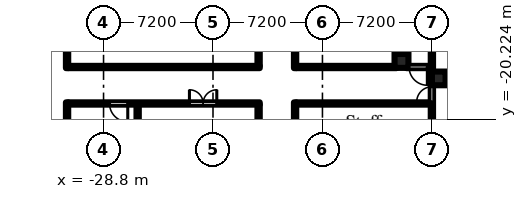
"""IFC4 building model, lengths in metres.
Left out: names, types, materials, properties, quantities, classifications, styles, units other than length and angle.
Written with IfcOpenShell. Run it as: python <this file> out.ifc"""

import sys

from ifc_helpers import new_model, si_unit, direction, frame, frame_2d, origin, origin_2d, place, context, subcontext, project, spatial, rectangle, hollow_circle, extrude, element, fill, save


model = new_model("IFC4")
c1 = context("Model", 3, precision=1e-05, world=origin(), true_north=direction((0.0, 1.0)))
c2 = subcontext(c1, "Body", "Model", "MODEL_VIEW")
j1 = project(units=[si_unit("LENGTHUNIT", "METRE"), si_unit("PLANEANGLEUNIT", "RADIAN")], contexts=[c1])
p1 = place(None, origin())
s1 = spatial("IfcSite", under=j1, at=p1, CompositionType="ELEMENT")
p2 = place(p1, origin())
s2 = spatial("IfcBuilding", under=s1, at=p2, CompositionType="ELEMENT")
p3 = place(p2, origin())
s3 = spatial("IfcBuildingStorey", under=s2, at=p3, CompositionType="ELEMENT", Elevation=0.0)
p4 = place(p3, frame((-6.75, -17.55, 0.0), z_axis=(0.0, 0.0, 1.0), x_axis=(1.0, 0.0, 0.0)))
e1 = element("IfcColumn", 1, at=p4, inside=s3, PredefinedType="COLUMN", context=c2, shape_type="SweptSolid", body=[
    extrude(rectangle(XDim=0.9, YDim=0.9, at=origin_2d()), origin(), (0.0, 0.0, 1.0), 7.2),
])
p5 = place(p3, frame((-9.2, -16.4, 0.0), z_axis=(0.0, 0.0, 1.0), x_axis=(1.0, 0.0, 0.0)))
e2 = element("IfcColumn", 2, at=p5, inside=s3, PredefinedType="COLUMN", context=c2, shape_type="SweptSolid", body=[
    extrude(hollow_circle(Radius=0.457, WallThickness=0.05, at=origin_2d()), origin(), (0.0, 0.0, 1.0), 7.5),
])
p6 = place(p3, frame((-31.2, -31.275, 0.0), z_axis=(0.0, 0.0, 1.0), x_axis=(0.0, 1.0, 0.0)))
e3 = element("IfcWall", 3, at=p6, inside=s3, PredefinedType="PARTITIONING", context=c2, shape_type="SweptSolid", body=[
    extrude(rectangle(XDim=12.15, YDim=0.15, at=frame_2d((6.075, 0.0))), origin(), (0.0, 0.0, 1.0), 6.6),
])
p7 = place(p3, frame((-31.125, -19.2, 0.0), z_axis=(0.0, 0.0, 1.0), x_axis=(1.0, 0.0, 0.0)))
e4 = element("IfcWall", 4, at=p7, inside=s3, PredefinedType="PARTITIONING", context=c2, shape_type="SweptSolid", body=[
    extrude(rectangle(XDim=12.6, YDim=0.15, at=frame_2d((6.3, 0.0))), origin(), (0.0, 0.0, 1.0), 6.6),
])
p8 = place(p7, frame((2.718, 0.0, 0.0)))
e5 = element("IfcOpeningElement", 5, at=p8, cuts=e4, PredefinedType="OPENING", context=c2, shape_type="SweptSolid", body=[
    extrude(rectangle(XDim=1.2, YDim=2.1, at=frame_2d((0.6, 1.05))), frame((0.0, 0.085, 0.0), z_axis=(0.0, -1.0, 0.0), x_axis=(1.0, 0.0, 0.0)), (0.0, 0.0, 1.0), 0.17),
])
p9 = place(p7, frame((7.975, 0.0, 0.0)))
e6 = element("IfcOpeningElement", 6, at=p9, cuts=e4, PredefinedType="OPENING", context=c2, shape_type="SweptSolid", body=[
    extrude(rectangle(XDim=1.8, YDim=2.1, at=frame_2d((0.9, 1.05))), frame((0.0, 0.085, 0.0), z_axis=(0.0, -1.0, 0.0), x_axis=(1.0, 0.0, 0.0)), (0.0, 0.0, 1.0), 0.17),
])
p10 = place(p3, frame((-31.2, -16.875, 0.0), z_axis=(0.0, 0.0, 1.0), x_axis=(0.0, 1.0, 0.0)))
e7 = element("IfcWall", 7, at=p10, inside=s3, PredefinedType="PARTITIONING", context=c2, shape_type="SweptSolid", body=[
    extrude(rectangle(XDim=6.55, YDim=0.15, at=frame_2d((3.275, 0.0))), origin(), (0.0, 0.0, 1.0), 6.6),
])
p11 = place(p10, frame((1.325, 0.0, 0.0)))
e8 = element("IfcOpeningElement", 8, at=p11, cuts=e7, PredefinedType="OPENING", context=c2, shape_type="SweptSolid", body=[
    extrude(rectangle(XDim=1.8, YDim=2.1, at=frame_2d((0.9, 1.05))), frame((0.0, 0.085, 0.0), z_axis=(0.0, -1.0, 0.0), x_axis=(1.0, 0.0, 0.0)), (0.0, 0.0, 1.0), 0.17),
])
p12 = place(p3, frame((-31.125, -16.8, 0.0), z_axis=(0.0, 0.0, 1.0), x_axis=(1.0, 0.0, 0.0)))
e9 = element("IfcWall", 9, at=p12, inside=s3, PredefinedType="PARTITIONING", context=c2, shape_type="SweptSolid", body=[
    extrude(rectangle(XDim=12.6, YDim=0.15, at=frame_2d((6.3, 0.0))), origin(), (0.0, 0.0, 1.0), 6.6),
])
for number, where, z_axis, x_axis in (
    (10, (-26.557, -31.125, 0.0), (0.0, 0.0, 1.0), (0.0, 1.0, 0.0)),
    (11, (-18.6, -31.125, 0.0), (0.0, 0.0, 1.0), (0.0, 1.0, 0.0)),
):
    element("IfcWall", number, at=place(p3, frame(where, z_axis=z_axis, x_axis=x_axis)), inside=s3, PredefinedType="PARTITIONING", context=c2, shape_type="SweptSolid", body=[
        extrude(rectangle(XDim=11.85, YDim=0.15, at=frame_2d((5.925, 0.0))), origin(), (0.0, 0.0, 1.0), 6.6),
    ])
p13 = place(p3, frame((-18.6, -16.725, 0.0), z_axis=(0.0, 0.0, 1.0), x_axis=(0.0, 1.0, 0.0)))
e12 = element("IfcWall", 12, at=p13, inside=s3, PredefinedType="PARTITIONING", context=c2, shape_type="SweptSolid", body=[
    extrude(rectangle(XDim=6.4, YDim=0.15, at=frame_2d((3.2, 0.0))), origin(), (0.0, 0.0, 1.0), 6.6),
])
p14 = place(p13, frame((3.425, 0.0, 0.0)))
e13 = element("IfcOpeningElement", 13, at=p14, cuts=e12, PredefinedType="OPENING", context=c2, shape_type="SweptSolid", body=[
    extrude(rectangle(XDim=1.8, YDim=2.1, at=frame_2d((0.9, 1.05))), frame((0.0, 0.085, 0.0), z_axis=(0.0, -1.0, 0.0), x_axis=(1.0, 0.0, 0.0)), (0.0, 0.0, 1.0), 0.17),
])
p15 = place(p3, frame((-16.2, -31.275, 0.0), z_axis=(0.0, 0.0, 1.0), x_axis=(0.0, 1.0, 0.0)))
e14 = element("IfcWall", 14, at=p15, inside=s3, PredefinedType="PARTITIONING", context=c2, shape_type="SweptSolid", body=[
    extrude(rectangle(XDim=12.15, YDim=0.15, at=frame_2d((6.075, 0.0))), origin(), (0.0, 0.0, 1.0), 6.6),
])
p16 = place(p15, frame((1.717, 0.0, 0.0)))
e15 = element("IfcOpeningElement", 15, at=p16, cuts=e14, PredefinedType="OPENING", context=c2, shape_type="SweptSolid", body=[
    extrude(rectangle(XDim=1.2, YDim=2.1, at=frame_2d((0.6, 1.05))), frame((0.0, 0.085, 0.0), z_axis=(0.0, -1.0, 0.0), x_axis=(1.0, 0.0, 0.0)), (0.0, 0.0, 1.0), 0.17),
])
p17 = place(p15, frame((6.925, 0.0, 0.0)))
e16 = element("IfcOpeningElement", 16, at=p17, cuts=e14, PredefinedType="OPENING", context=c2, shape_type="SweptSolid", body=[
    extrude(rectangle(XDim=1.8, YDim=2.1, at=frame_2d((0.9, 1.05))), frame((0.0, 0.085, 0.0), z_axis=(0.0, -1.0, 0.0), x_axis=(1.0, 0.0, 0.0)), (0.0, 0.0, 1.0), 0.17),
])
p18 = place(p3, frame((-16.125, -19.2, 0.0), z_axis=(0.0, 0.0, 1.0), x_axis=(1.0, 0.0, 0.0)))
e17 = element("IfcWall", 17, at=p18, inside=s3, PredefinedType="PARTITIONING", context=c2, shape_type="SweptSolid", body=[
    extrude(rectangle(XDim=8.85, YDim=0.15, at=frame_2d((4.425, 0.0))), origin(), (0.0, 0.0, 1.0), 6.6),
])
p19 = place(p3, frame((-16.2, -16.875, 0.0), z_axis=(0.0, 0.0, 1.0), x_axis=(0.0, 1.0, 0.0)))
e18 = element("IfcWall", 18, at=p19, inside=s3, PredefinedType="PARTITIONING", context=c2, shape_type="SweptSolid", body=[
    extrude(rectangle(XDim=6.55, YDim=0.15, at=frame_2d((3.275, 0.0))), origin(), (0.0, 0.0, 1.0), 6.6),
])
p20 = place(p19, frame((1.911, 0.0, 0.0)))
e19 = element("IfcOpeningElement", 19, at=p20, cuts=e18, PredefinedType="OPENING", context=c2, shape_type="SweptSolid", body=[
    extrude(rectangle(XDim=1.2, YDim=2.1, at=frame_2d((0.6, 1.05))), frame((0.0, 0.085, 0.0), z_axis=(0.0, -1.0, 0.0), x_axis=(1.0, 0.0, 0.0)), (0.0, 0.0, 1.0), 0.17),
])
p21 = place(p19, frame((4.411, 0.0, 0.0)))
e20 = element("IfcOpeningElement", 20, at=p21, cuts=e18, PredefinedType="OPENING", context=c2, shape_type="SweptSolid", body=[
    extrude(rectangle(XDim=1.2, YDim=2.1, at=frame_2d((0.6, 1.05))), frame((0.0, 0.085, 0.0), z_axis=(0.0, -1.0, 0.0), x_axis=(1.0, 0.0, 0.0)), (0.0, 0.0, 1.0), 0.17),
])
p22 = place(p3, frame((-16.125, -16.8, 0.0), z_axis=(0.0, 0.0, 1.0), x_axis=(1.0, 0.0, 0.0)))
e21 = element("IfcWall", 21, at=p22, inside=s3, PredefinedType="PARTITIONING", context=c2, shape_type="SweptSolid", body=[
    extrude(rectangle(XDim=6.604, YDim=0.15, at=frame_2d((3.302, 0.0))), origin(), (0.0, 0.0, 1.0), 6.6),
])
p23 = place(p3, frame((-8.878, -16.8, 0.0), z_axis=(0.0, 0.0, 1.0), x_axis=(1.0, 0.0, 0.0)))
e22 = element("IfcWall", 22, at=p23, inside=s3, PredefinedType="PARTITIONING", context=c2, shape_type="SweptSolid", body=[
    extrude(rectangle(XDim=1.604, YDim=0.15, at=frame_2d((0.802, 0.0))), origin(), (0.0, 0.0, 1.0), 6.6),
])
p24 = place(p23, frame((0.178, 0.0, 0.0)))
e23 = element("IfcOpeningElement", 23, at=p24, cuts=e22, PredefinedType="OPENING", context=c2, shape_type="SweptSolid", body=[
    extrude(rectangle(XDim=1.2, YDim=2.1, at=frame_2d((0.6, 1.05))), frame((0.0, 0.085, 0.0), z_axis=(0.0, -1.0, 0.0), x_axis=(1.0, 0.0, 0.0)), (0.0, 0.0, 1.0), 0.17),
])
p25 = place(p3, frame((-7.2, -31.125, 0.0), z_axis=(0.0, 0.0, 1.0), x_axis=(0.0, 1.0, 0.0)))
e24 = element("IfcWall", 24, at=p25, inside=s3, PredefinedType="PARTITIONING", context=c2, shape_type="SweptSolid", body=[
    extrude(rectangle(XDim=23.988, YDim=0.15, at=frame_2d((11.994, 0.0))), origin(), (0.0, 0.0, 1.0), 6.3),
])
p26 = place(p25, frame((12.025, 0.0, 0.0)))
e25 = element("IfcOpeningElement", 25, at=p26, cuts=e24, PredefinedType="OPENING", context=c2, shape_type="SweptSolid", body=[
    extrude(rectangle(XDim=1.0, YDim=2.1, at=frame_2d((0.5, 1.05))), frame((0.0, 0.085, 0.0), z_axis=(0.0, -1.0, 0.0), x_axis=(1.0, 0.0, 0.0)), (0.0, 0.0, 1.0), 0.17),
])
p27 = place(p25, frame((6.767, 0.0, 0.0)))
e26 = element("IfcOpeningElement", 26, at=p27, cuts=e24, PredefinedType="OPENING", context=c2, shape_type="SweptSolid", body=[
    extrude(rectangle(XDim=1.8, YDim=2.1, at=frame_2d((0.9, 1.05))), frame((0.0, 0.085, 0.0), z_axis=(0.0, -1.0, 0.0), x_axis=(1.0, 0.0, 0.0)), (0.0, 0.0, 1.0), 0.17),
])
p28 = place(p26, origin())
e27 = element("IfcDoor", 27, at=p28, inside=s3, OperationType="SINGLE_SWING_LEFT", PredefinedType="DOOR", context=c2, shape_type="SweptSolid", body=[
    extrude(rectangle(XDim=1.0, YDim=2.1, at=frame_2d((0.5, 1.05))), frame((0.0, 0.025, 0.0), z_axis=(0.0, -1.0, 0.0), x_axis=(1.0, 0.0, 0.0)), (0.0, 0.0, 1.0), 0.05),
])
fill(e25, e27)
p29 = place(p24, frame((1.2, 0.0, 0.0), z_axis=(0.0, 0.0, 1.0), x_axis=(-1.0, 0.0, 0.0)))
e28 = element("IfcDoor", 28, at=p29, inside=s3, OperationType="SINGLE_SWING_LEFT", PredefinedType="DOOR", context=c2, shape_type="SweptSolid", body=[
    extrude(rectangle(XDim=1.2, YDim=2.1, at=frame_2d((0.6, 1.05))), frame((0.0, 0.025, 0.0), z_axis=(0.0, -1.0, 0.0), x_axis=(1.0, 0.0, 0.0)), (0.0, 0.0, 1.0), 0.05),
])
fill(e23, e28)
p30 = place(p8, frame((1.2, 0.0, 0.0), z_axis=(0.0, 0.0, 1.0), x_axis=(-1.0, 0.0, 0.0)))
e29 = element("IfcDoor", 29, at=p30, inside=s3, OperationType="SINGLE_SWING_LEFT", PredefinedType="DOOR", context=c2, shape_type="SweptSolid", body=[
    extrude(rectangle(XDim=1.2, YDim=2.1, at=frame_2d((0.6, 1.05))), frame((0.0, 0.025, 0.0), z_axis=(0.0, -1.0, 0.0), x_axis=(1.0, 0.0, 0.0)), (0.0, 0.0, 1.0), 0.05),
])
fill(e5, e29)
p31 = place(p9, origin())
e30 = element("IfcDoor", 30, at=p31, inside=s3, OperationType="DOUBLE_DOOR_DOUBLE_SWING", PredefinedType="DOOR", context=c2, shape_type="SweptSolid", body=[
    extrude(rectangle(XDim=1.8, YDim=2.1, at=frame_2d((0.9, 1.05))), frame((0.0, 0.025, 0.0), z_axis=(0.0, -1.0, 0.0), x_axis=(1.0, 0.0, 0.0)), (0.0, 0.0, 1.0), 0.05),
])
fill(e6, e30)
save(model, sys.argv[1])
